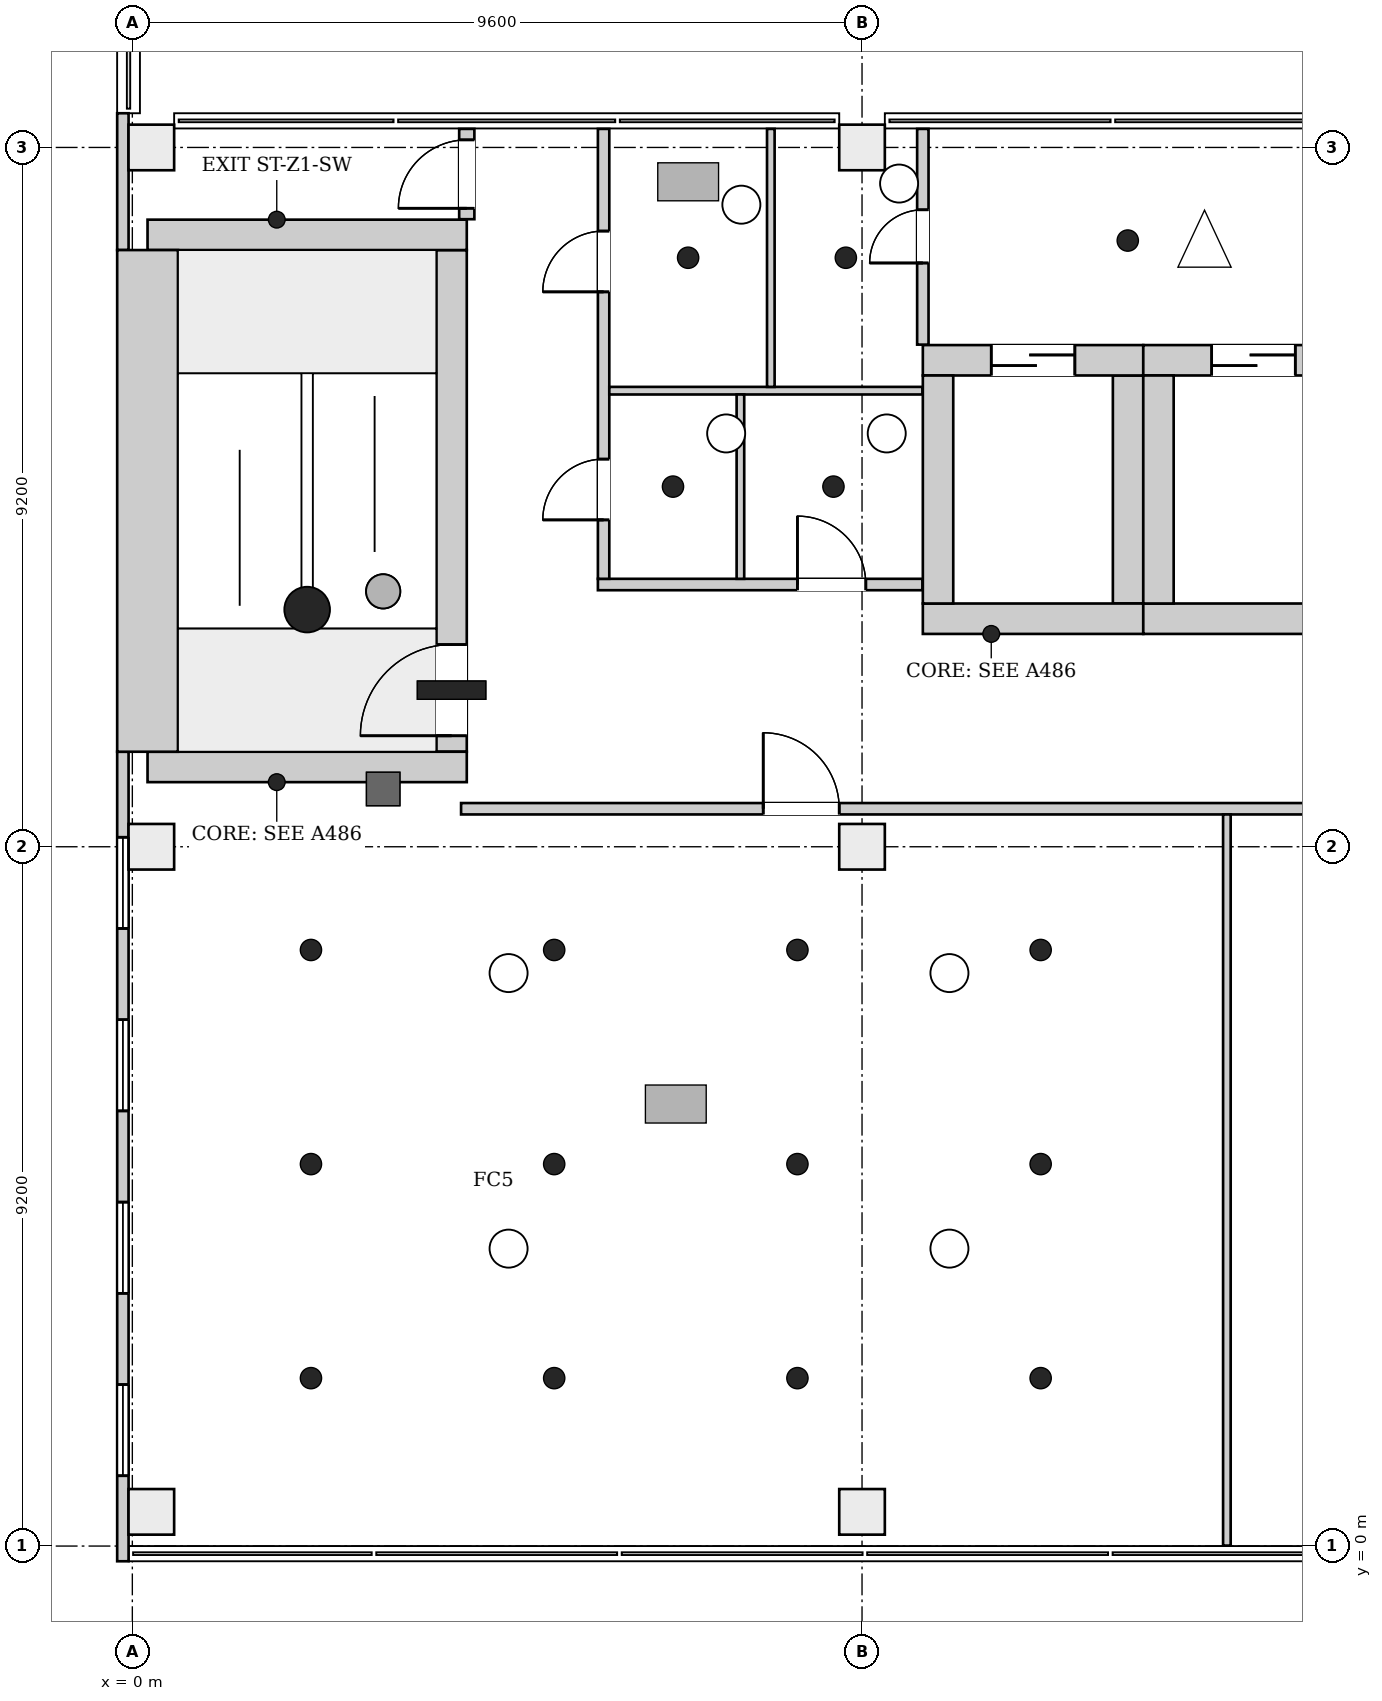
"""IFC4 building model, lengths in metres.
Left out: names, types, materials, properties, quantities, classifications, styles, units other than length and angle.
Written with IfcOpenShell. Run it as: python <this file> out.ifc"""

import sys

from ifc_helpers import new_model, si_unit, direction, frame, frame_2d, origin, origin_2d, place, context, subcontext, project, spatial, rectangle, extrude, element, fill, save


model = new_model("IFC4")
c1 = context("Model", 3, precision=1e-05, world=origin(), true_north=direction((0.0, 1.0)))
c2 = subcontext(c1, "Body", "Model", "MODEL_VIEW")
j1 = project(units=[si_unit("LENGTHUNIT", "METRE"), si_unit("PLANEANGLEUNIT", "RADIAN")], contexts=[c1])
p1 = place(None, origin())
s1 = spatial("IfcSite", under=j1, at=p1, CompositionType="ELEMENT")
p2 = place(p1, origin())
s2 = spatial("IfcBuilding", under=s1, at=p2, CompositionType="ELEMENT")
p3 = place(p2, frame((0.0, 0.0, 73.9)))
s3 = spatial("IfcBuildingStorey", under=s2, at=p3, CompositionType="ELEMENT", Elevation=73.9)
for number, where, z_axis, x_axis in (
    (1, (0.2, 10.25, 0.0), (0.0, 0.0, 1.0), (1.0, 0.0, 0.0)),
    (2, (0.2, 17.25, 0.0), (0.0, 0.0, 1.0), (1.0, 0.0, 0.0)),
):
    element("IfcWall", number, at=place(p3, frame(where, z_axis=z_axis, x_axis=x_axis)), inside=s3, PredefinedType="SHEAR", context=c2, shape_type="SweptSolid", body=[
        extrude(rectangle(XDim=4.2, YDim=0.4, at=frame_2d((2.1, 0.0))), origin(), (0.0, 0.0, 1.0), 4.2),
    ])
p4 = place(p3, frame((0.2, 10.45, 0.0), z_axis=(0.0, 0.0, 1.0), x_axis=(0.0, 1.0, 0.0)))
e3 = element("IfcWall", 3, at=p4, inside=s3, PredefinedType="SHEAR", context=c2, shape_type="SweptSolid", body=[
    extrude(rectangle(XDim=6.6, YDim=0.8, at=frame_2d((3.3, 0.0))), origin(), (0.0, 0.0, 1.0), 4.2),
])
p5 = place(p3, frame((4.2, 10.45, 0.0), z_axis=(0.0, 0.0, 1.0), x_axis=(0.0, 1.0, 0.0)))
e4 = element("IfcWall", 4, at=p5, inside=s3, PredefinedType="SHEAR", context=c2, shape_type="SweptSolid", body=[
    extrude(rectangle(XDim=6.6, YDim=0.4, at=frame_2d((3.3, 0.0))), origin(), (0.0, 0.0, 1.0), 4.2),
])
p6 = place(p5, frame((0.21, 0.0, 0.0)))
e5 = element("IfcOpeningElement", 5, at=p6, cuts=e4, PredefinedType="OPENING", context=c2, shape_type="SweptSolid", body=[
    extrude(rectangle(XDim=1.2, YDim=2.1, at=frame_2d((0.6, 1.05))), frame((0.0, 0.21, 0.0), z_axis=(0.0, -1.0, 0.0), x_axis=(1.0, 0.0, 0.0)), (0.0, 0.0, 1.0), 0.42),
])
p7 = place(p3, frame((10.4, 12.2, 0.0), z_axis=(0.0, 0.0, 1.0), x_axis=(1.0, 0.0, 0.0)))
e6 = element("IfcWall", 6, at=p7, inside=s3, PredefinedType="SHEAR", context=c2, shape_type="SweptSolid", body=[
    extrude(rectangle(XDim=2.9, YDim=0.4, at=frame_2d((1.45, 0.0))), origin(), (0.0, 0.0, 1.0), 4.2),
])
p8 = place(p3, frame((10.4, 15.6, 0.0), z_axis=(0.0, 0.0, 1.0), x_axis=(1.0, 0.0, 0.0)))
e7 = element("IfcWall", 7, at=p8, inside=s3, PredefinedType="SHEAR", context=c2, shape_type="SweptSolid", body=[
    extrude(rectangle(XDim=2.9, YDim=0.4, at=frame_2d((1.45, 0.0))), origin(), (0.0, 0.0, 1.0), 4.2),
])
p9 = place(p8, frame((0.9, 0.0, 0.0)))
e8 = element("IfcOpeningElement", 8, at=p9, cuts=e7, PredefinedType="OPENING", context=c2, shape_type="SweptSolid", body=[
    extrude(rectangle(XDim=1.1, YDim=2.1, at=frame_2d((0.55, 1.05))), frame((0.0, 0.21, 0.0), z_axis=(0.0, -1.0, 0.0), x_axis=(1.0, 0.0, 0.0)), (0.0, 0.0, 1.0), 0.42),
])
for number, where, z_axis, x_axis in (
    (9, (10.6, 12.4, 0.0), (0.0, 0.0, 1.0), (0.0, 1.0, 0.0)),
    (10, (13.1, 12.4, 0.0), (0.0, 0.0, 1.0), (0.0, 1.0, 0.0)),
):
    element("IfcWall", number, at=place(p3, frame(where, z_axis=z_axis, x_axis=x_axis)), inside=s3, PredefinedType="SHEAR", context=c2, shape_type="SweptSolid", body=[
        extrude(rectangle(XDim=3.0, YDim=0.4, at=frame_2d((1.5, 0.0))), origin(), (0.0, 0.0, 1.0), 4.2),
    ])
p10 = place(p3, frame((13.3, 12.2, 0.0), z_axis=(0.0, 0.0, 1.0), x_axis=(1.0, 0.0, 0.0)))
e11 = element("IfcWall", 11, at=p10, inside=s3, PredefinedType="SHEAR", context=c2, shape_type="SweptSolid", body=[
    extrude(rectangle(XDim=2.9, YDim=0.4, at=frame_2d((1.45, 0.0))), origin(), (0.0, 0.0, 1.0), 4.2),
])
p11 = place(p3, frame((13.3, 15.6, 0.0), z_axis=(0.0, 0.0, 1.0), x_axis=(1.0, 0.0, 0.0)))
e12 = element("IfcWall", 12, at=p11, inside=s3, PredefinedType="SHEAR", context=c2, shape_type="SweptSolid", body=[
    extrude(rectangle(XDim=2.9, YDim=0.4, at=frame_2d((1.45, 0.0))), origin(), (0.0, 0.0, 1.0), 4.2),
])
p12 = place(p11, frame((0.9, 0.0, 0.0)))
e13 = element("IfcOpeningElement", 13, at=p12, cuts=e12, PredefinedType="OPENING", context=c2, shape_type="SweptSolid", body=[
    extrude(rectangle(XDim=1.1, YDim=2.1, at=frame_2d((0.55, 1.05))), frame((0.0, 0.21, 0.0), z_axis=(0.0, -1.0, 0.0), x_axis=(1.0, 0.0, 0.0)), (0.0, 0.0, 1.0), 0.42),
])
p13 = place(p3, frame((13.5, 12.4, 0.0), z_axis=(0.0, 0.0, 1.0), x_axis=(0.0, 1.0, 0.0)))
e14 = element("IfcWall", 14, at=p13, inside=s3, PredefinedType="SHEAR", context=c2, shape_type="SweptSolid", body=[
    extrude(rectangle(XDim=3.0, YDim=0.4, at=frame_2d((1.5, 0.0))), origin(), (0.0, 0.0, 1.0), 4.2),
])
for number, where, z_axis, x_axis in (
    (15, (0.25, 0.45, 0.0), (0.0, 0.0, 1.0), (1.0, 0.0, 0.0)),
    (16, (9.6, 0.45, 0.0), (0.0, 0.0, 1.0), (1.0, 0.0, 0.0)),
    (17, (0.25, 9.2, 0.0), (0.0, 0.0, 1.0), (1.0, 0.0, 0.0)),
    (18, (9.6, 9.2, 0.0), (0.0, 0.0, 1.0), (1.0, 0.0, 0.0)),
    (19, (0.25, 18.4, 0.0), (0.0, 0.0, 1.0), (1.0, 0.0, 0.0)),
    (20, (9.6, 18.4, 0.0), (0.0, 0.0, 1.0), (1.0, 0.0, 0.0)),
):
    element("IfcColumn", number, at=place(p3, frame(where, z_axis=z_axis, x_axis=x_axis)), inside=s3, PredefinedType="COLUMN", context=c2, shape_type="SweptSolid", body=[
        extrude(rectangle(XDim=0.6, YDim=0.6, at=origin_2d()), origin(), (0.0, 0.0, 1.0), 4.2),
    ])
p14 = place(p3, frame((-0.125, 10.45, 0.0), z_axis=(0.0, 0.0, 1.0), x_axis=(0.0, -1.0, 0.0)))
e21 = element("IfcWall", 21, at=p14, inside=s3, PredefinedType="ELEMENTEDWALL", context=c2, shape_type="SweptSolid", body=[
    extrude(rectangle(XDim=10.65, YDim=0.15, at=frame_2d((5.325, 0.0))), origin(), (0.0, 0.0, 1.0), 3.9),
])
p15 = place(p14, frame((8.325, 0.0, 0.9)))
e22 = element("IfcOpeningElement", 22, at=p15, cuts=e21, PredefinedType="OPENING", context=c2, shape_type="SweptSolid", body=[
    extrude(rectangle(XDim=1.2, YDim=2.6, at=frame_2d((0.6, 1.3))), frame((0.0, 0.085, 0.0), z_axis=(0.0, -1.0, 0.0), x_axis=(1.0, 0.0, 0.0)), (0.0, 0.0, 1.0), 0.17),
])
p16 = place(p14, frame((5.925, 0.0, 0.9)))
e23 = element("IfcOpeningElement", 23, at=p16, cuts=e21, PredefinedType="OPENING", context=c2, shape_type="SweptSolid", body=[
    extrude(rectangle(XDim=1.2, YDim=2.6, at=frame_2d((0.6, 1.3))), frame((0.0, 0.085, 0.0), z_axis=(0.0, -1.0, 0.0), x_axis=(1.0, 0.0, 0.0)), (0.0, 0.0, 1.0), 0.17),
])
p17 = place(p14, frame((3.525, 0.0, 0.9)))
e24 = element("IfcOpeningElement", 24, at=p17, cuts=e21, PredefinedType="OPENING", context=c2, shape_type="SweptSolid", body=[
    extrude(rectangle(XDim=1.2, YDim=2.6, at=frame_2d((0.6, 1.3))), frame((0.0, 0.085, 0.0), z_axis=(0.0, -1.0, 0.0), x_axis=(1.0, 0.0, 0.0)), (0.0, 0.0, 1.0), 0.17),
])
p18 = place(p14, frame((1.125, 0.0, 0.9)))
e25 = element("IfcOpeningElement", 25, at=p18, cuts=e21, PredefinedType="OPENING", context=c2, shape_type="SweptSolid", body=[
    extrude(rectangle(XDim=1.2, YDim=2.6, at=frame_2d((0.6, 1.3))), frame((0.0, 0.085, 0.0), z_axis=(0.0, -1.0, 0.0), x_axis=(1.0, 0.0, 0.0)), (0.0, 0.0, 1.0), 0.17),
])
p19 = place(p3, frame((-0.125, 18.85, 0.0), z_axis=(0.0, 0.0, 1.0), x_axis=(0.0, -1.0, 0.0)))
e26 = element("IfcWall", 26, at=p19, inside=s3, PredefinedType="ELEMENTEDWALL", context=c2, shape_type="SweptSolid", body=[
    extrude(rectangle(XDim=1.8, YDim=0.15, at=frame_2d((0.9, 0.0))), origin(), (0.0, 0.0, 1.0), 3.9),
])
p20 = place(p3, frame((4.4, 17.456, 0.0), z_axis=(0.0, 0.0, 1.0), x_axis=(0.0, 1.0, 0.0)))
e27 = element("IfcWall", 27, at=p20, inside=s3, PredefinedType="PARTITIONING", context=c2, shape_type="SweptSolid", body=[
    extrude(rectangle(XDim=1.188, YDim=0.2, at=frame_2d((0.594, 0.0))), origin(), (0.0, 0.0, 1.0), 3.9),
])
p21 = place(p20, frame((0.144, 0.0, 0.0)))
e28 = element("IfcOpeningElement", 28, at=p21, cuts=e27, PredefinedType="OPENING", context=c2, shape_type="SweptSolid", body=[
    extrude(rectangle(XDim=0.9, YDim=2.1, at=frame_2d((0.45, 1.05))), frame((0.0, 0.11, 0.0), z_axis=(0.0, -1.0, 0.0), x_axis=(1.0, 0.0, 0.0)), (0.0, 0.0, 1.0), 0.22),
])
p22 = place(p3, frame((4.325, 9.7, 0.0), z_axis=(0.0, 0.0, 1.0), x_axis=(1.0, 0.0, 0.0)))
e29 = element("IfcWall", 29, at=p22, inside=s3, PredefinedType="PARTITIONING", context=c2, shape_type="SweptSolid", body=[
    extrude(rectangle(XDim=34.369, YDim=0.15, at=frame_2d((17.185, 0.0))), origin(), (0.0, 0.0, 1.0), 3.9),
])
p23 = place(p22, frame((3.975, 0.0, 0.0)))
e30 = element("IfcOpeningElement", 30, at=p23, cuts=e29, PredefinedType="OPENING", context=c2, shape_type="SweptSolid", body=[
    extrude(rectangle(XDim=1.0, YDim=2.1, at=frame_2d((0.5, 1.05))), frame((0.0, 0.085, 0.0), z_axis=(0.0, -1.0, 0.0), x_axis=(1.0, 0.0, 0.0)), (0.0, 0.0, 1.0), 0.17),
])
p24 = place(p22, frame((11.975, 0.0, 0.0)))
e31 = element("IfcOpeningElement", 31, at=p24, cuts=e29, PredefinedType="OPENING", context=c2, shape_type="SweptSolid", body=[
    extrude(rectangle(XDim=1.0, YDim=2.1, at=frame_2d((0.5, 1.05))), frame((0.0, 0.085, 0.0), z_axis=(0.0, -1.0, 0.0), x_axis=(1.0, 0.0, 0.0)), (0.0, 0.0, 1.0), 0.17),
])
p25 = place(p22, frame((19.175, 0.0, 0.0)))
e32 = element("IfcOpeningElement", 32, at=p25, cuts=e29, PredefinedType="OPENING", context=c2, shape_type="SweptSolid", body=[
    extrude(rectangle(XDim=1.0, YDim=2.1, at=frame_2d((0.5, 1.05))), frame((0.0, 0.085, 0.0), z_axis=(0.0, -1.0, 0.0), x_axis=(1.0, 0.0, 0.0)), (0.0, 0.0, 1.0), 0.17),
])
p26 = place(p22, frame((28.925, 0.0, 0.0)))
e33 = element("IfcOpeningElement", 33, at=p26, cuts=e29, PredefinedType="OPENING", context=c2, shape_type="SweptSolid", body=[
    extrude(rectangle(XDim=1.0, YDim=2.1, at=frame_2d((0.5, 1.05))), frame((0.0, 0.085, 0.0), z_axis=(0.0, -1.0, 0.0), x_axis=(1.0, 0.0, 0.0)), (0.0, 0.0, 1.0), 0.17),
])
p27 = place(p3, frame((6.125, 12.65, 0.0), z_axis=(0.0, 0.0, 1.0), x_axis=(1.0, 0.0, 0.0)))
e34 = element("IfcWall", 34, at=p27, inside=s3, PredefinedType="PARTITIONING", context=c2, shape_type="SweptSolid", body=[
    extrude(rectangle(XDim=4.269, YDim=0.15, at=frame_2d((2.135, 0.0))), origin(), (0.0, 0.0, 1.0), 3.9),
])
p28 = place(p27, frame((2.625, 0.0, 0.0)))
e35 = element("IfcOpeningElement", 35, at=p28, cuts=e34, PredefinedType="OPENING", context=c2, shape_type="SweptSolid", body=[
    extrude(rectangle(XDim=0.9, YDim=2.1, at=frame_2d((0.45, 1.05))), frame((0.0, 0.085, 0.0), z_axis=(0.0, -1.0, 0.0), x_axis=(1.0, 0.0, 0.0)), (0.0, 0.0, 1.0), 0.17),
])
p29 = place(p3, frame((6.2, 12.725, 0.0), z_axis=(0.0, 0.0, 1.0), x_axis=(0.0, 1.0, 0.0)))
e36 = element("IfcWall", 36, at=p29, inside=s3, PredefinedType="PARTITIONING", context=c2, shape_type="SweptSolid", body=[
    extrude(rectangle(XDim=5.919, YDim=0.15, at=frame_2d((2.959, 0.0))), origin(), (0.0, 0.0, 1.0), 3.9),
])
p30 = place(p29, frame((0.775, 0.0, 0.0)))
e37 = element("IfcOpeningElement", 37, at=p30, cuts=e36, PredefinedType="OPENING", context=c2, shape_type="SweptSolid", body=[
    extrude(rectangle(XDim=0.8, YDim=2.1, at=frame_2d((0.4, 1.05))), frame((0.0, 0.085, 0.0), z_axis=(0.0, -1.0, 0.0), x_axis=(1.0, 0.0, 0.0)), (0.0, 0.0, 1.0), 0.17),
])
p31 = place(p29, frame((3.775, 0.0, 0.0)))
e38 = element("IfcOpeningElement", 38, at=p31, cuts=e36, PredefinedType="OPENING", context=c2, shape_type="SweptSolid", body=[
    extrude(rectangle(XDim=0.8, YDim=2.1, at=frame_2d((0.4, 1.05))), frame((0.0, 0.085, 0.0), z_axis=(0.0, -1.0, 0.0), x_axis=(1.0, 0.0, 0.0)), (0.0, 0.0, 1.0), 0.17),
])
p32 = place(p3, frame((6.275, 15.2, 0.0), z_axis=(0.0, 0.0, 1.0), x_axis=(1.0, 0.0, 0.0)))
e39 = element("IfcWall", 39, at=p32, inside=s3, PredefinedType="PARTITIONING", context=c2, shape_type="SweptSolid", body=[
    extrude(rectangle(XDim=4.119, YDim=0.1, at=frame_2d((2.06, 0.0))), origin(), (0.0, 0.0, 1.0), 3.9),
])
p33 = place(p3, frame((8.0, 12.725, 0.0), z_axis=(0.0, 0.0, 1.0), x_axis=(0.0, 1.0, 0.0)))
e40 = element("IfcWall", 40, at=p33, inside=s3, PredefinedType="PARTITIONING", context=c2, shape_type="SweptSolid", body=[
    extrude(rectangle(XDim=2.425, YDim=0.1, at=frame_2d((1.212, 0.0))), origin(), (0.0, 0.0, 1.0), 3.9),
])
p34 = place(p3, frame((8.4, 15.25, 0.0), z_axis=(0.0, 0.0, 1.0), x_axis=(0.0, 1.0, 0.0)))
e41 = element("IfcWall", 41, at=p34, inside=s3, PredefinedType="PARTITIONING", context=c2, shape_type="SweptSolid", body=[
    extrude(rectangle(XDim=3.394, YDim=0.1, at=frame_2d((1.697, 0.0))), origin(), (0.0, 0.0, 1.0), 3.9),
])
p35 = place(p3, frame((10.4, 15.806, 0.0), z_axis=(0.0, 0.0, 1.0), x_axis=(0.0, 1.0, 0.0)))
e42 = element("IfcWall", 42, at=p35, inside=s3, PredefinedType="PARTITIONING", context=c2, shape_type="SweptSolid", body=[
    extrude(rectangle(XDim=2.838, YDim=0.15, at=frame_2d((1.419, 0.0))), origin(), (0.0, 0.0, 1.0), 3.9),
])
p36 = place(p35, frame((1.074, 0.0, 0.0)))
e43 = element("IfcOpeningElement", 43, at=p36, cuts=e42, PredefinedType="OPENING", context=c2, shape_type="SweptSolid", body=[
    extrude(rectangle(XDim=0.7, YDim=2.1, at=frame_2d((0.35, 1.05))), frame((0.0, 0.085, 0.0), z_axis=(0.0, -1.0, 0.0), x_axis=(1.0, 0.0, 0.0)), (0.0, 0.0, 1.0), 0.17),
])
p37 = place(p3, frame((14.4, 0.006, 0.0), z_axis=(0.0, 0.0, 1.0), x_axis=(0.0, 1.0, 0.0)))
e44 = element("IfcWall", 44, at=p37, inside=s3, PredefinedType="PARTITIONING", context=c2, shape_type="SweptSolid", body=[
    extrude(rectangle(XDim=9.619, YDim=0.1, at=frame_2d((4.81, 0.0))), origin(), (0.0, 0.0, 1.0), 3.9),
])
p38 = place(p15, origin())
e45 = element("IfcWindow", 45, at=p38, inside=s3, PartitioningType="SINGLE_PANEL", PredefinedType="WINDOW", context=c2, shape_type="SweptSolid", body=[
    extrude(rectangle(XDim=1.2, YDim=2.6, at=frame_2d((0.6, 1.3))), frame((0.0, 0.03, 0.0), z_axis=(0.0, -1.0, 0.0), x_axis=(1.0, 0.0, 0.0)), (0.0, 0.0, 1.0), 0.06),
])
fill(e22, e45)
p39 = place(p16, origin())
e46 = element("IfcWindow", 46, at=p39, inside=s3, PartitioningType="SINGLE_PANEL", PredefinedType="WINDOW", context=c2, shape_type="SweptSolid", body=[
    extrude(rectangle(XDim=1.2, YDim=2.6, at=frame_2d((0.6, 1.3))), frame((0.0, 0.03, 0.0), z_axis=(0.0, -1.0, 0.0), x_axis=(1.0, 0.0, 0.0)), (0.0, 0.0, 1.0), 0.06),
])
fill(e23, e46)
p40 = place(p17, origin())
e47 = element("IfcWindow", 47, at=p40, inside=s3, PartitioningType="SINGLE_PANEL", PredefinedType="WINDOW", context=c2, shape_type="SweptSolid", body=[
    extrude(rectangle(XDim=1.2, YDim=2.6, at=frame_2d((0.6, 1.3))), frame((0.0, 0.03, 0.0), z_axis=(0.0, -1.0, 0.0), x_axis=(1.0, 0.0, 0.0)), (0.0, 0.0, 1.0), 0.06),
])
fill(e24, e47)
p41 = place(p18, origin())
e48 = element("IfcWindow", 48, at=p41, inside=s3, PartitioningType="SINGLE_PANEL", PredefinedType="WINDOW", context=c2, shape_type="SweptSolid", body=[
    extrude(rectangle(XDim=1.2, YDim=2.6, at=frame_2d((0.6, 1.3))), frame((0.0, 0.03, 0.0), z_axis=(0.0, -1.0, 0.0), x_axis=(1.0, 0.0, 0.0)), (0.0, 0.0, 1.0), 0.06),
])
fill(e25, e48)
p42 = place(p6, origin())
e49 = element("IfcDoor", 49, at=p42, inside=s3, OperationType="SINGLE_SWING_RIGHT", PredefinedType="DOOR", context=c2, shape_type="SweptSolid", body=[
    extrude(rectangle(XDim=1.2, YDim=2.1, at=frame_2d((0.6, 1.05))), frame((0.0, 0.025, 0.0), z_axis=(0.0, -1.0, 0.0), x_axis=(1.0, 0.0, 0.0)), (0.0, 0.0, 1.0), 0.05),
])
fill(e5, e49)
p43 = place(p9, origin())
e50 = element("IfcDoor", 50, at=p43, inside=s3, OperationType="DOUBLE_DOOR_SLIDING", PredefinedType="DOOR", context=c2, shape_type="SweptSolid", body=[
    extrude(rectangle(XDim=1.1, YDim=2.1, at=frame_2d((0.55, 1.05))), frame((0.0, 0.025, 0.0), z_axis=(0.0, -1.0, 0.0), x_axis=(1.0, 0.0, 0.0)), (0.0, 0.0, 1.0), 0.05),
])
fill(e8, e50)
p44 = place(p12, origin())
e51 = element("IfcDoor", 51, at=p44, inside=s3, OperationType="DOUBLE_DOOR_SLIDING", PredefinedType="DOOR", context=c2, shape_type="SweptSolid", body=[
    extrude(rectangle(XDim=1.1, YDim=2.1, at=frame_2d((0.55, 1.05))), frame((0.0, 0.025, 0.0), z_axis=(0.0, -1.0, 0.0), x_axis=(1.0, 0.0, 0.0)), (0.0, 0.0, 1.0), 0.05),
])
fill(e13, e51)
p45 = place(p21, origin())
e52 = element("IfcDoor", 52, at=p45, inside=s3, OperationType="SINGLE_SWING_LEFT", PredefinedType="DOOR", context=c2, shape_type="SweptSolid", body=[
    extrude(rectangle(XDim=0.9, YDim=2.1, at=frame_2d((0.45, 1.05))), frame((0.0, 0.025, 0.0), z_axis=(0.0, -1.0, 0.0), x_axis=(1.0, 0.0, 0.0)), (0.0, 0.0, 1.0), 0.05),
])
fill(e28, e52)
p46 = place(p30, origin())
e53 = element("IfcDoor", 53, at=p46, inside=s3, OperationType="SINGLE_SWING_LEFT", PredefinedType="DOOR", context=c2, shape_type="SweptSolid", body=[
    extrude(rectangle(XDim=0.8, YDim=2.1, at=frame_2d((0.4, 1.05))), frame((0.0, 0.025, 0.0), z_axis=(0.0, -1.0, 0.0), x_axis=(1.0, 0.0, 0.0)), (0.0, 0.0, 1.0), 0.05),
])
fill(e37, e53)
p47 = place(p28, origin())
e54 = element("IfcDoor", 54, at=p47, inside=s3, OperationType="SINGLE_SWING_RIGHT", PredefinedType="DOOR", context=c2, shape_type="SweptSolid", body=[
    extrude(rectangle(XDim=0.9, YDim=2.1, at=frame_2d((0.45, 1.05))), frame((0.0, 0.025, 0.0), z_axis=(0.0, -1.0, 0.0), x_axis=(1.0, 0.0, 0.0)), (0.0, 0.0, 1.0), 0.05),
])
fill(e35, e54)
p48 = place(p31, origin())
e55 = element("IfcDoor", 55, at=p48, inside=s3, OperationType="SINGLE_SWING_LEFT", PredefinedType="DOOR", context=c2, shape_type="SweptSolid", body=[
    extrude(rectangle(XDim=0.8, YDim=2.1, at=frame_2d((0.4, 1.05))), frame((0.0, 0.025, 0.0), z_axis=(0.0, -1.0, 0.0), x_axis=(1.0, 0.0, 0.0)), (0.0, 0.0, 1.0), 0.05),
])
fill(e38, e55)
p49 = place(p36, origin())
e56 = element("IfcDoor", 56, at=p49, inside=s3, OperationType="SINGLE_SWING_LEFT", PredefinedType="DOOR", context=c2, shape_type="SweptSolid", body=[
    extrude(rectangle(XDim=0.7, YDim=2.1, at=frame_2d((0.35, 1.05))), frame((0.0, 0.025, 0.0), z_axis=(0.0, -1.0, 0.0), x_axis=(1.0, 0.0, 0.0)), (0.0, 0.0, 1.0), 0.05),
])
fill(e43, e56)
p50 = place(p23, origin())
e57 = element("IfcDoor", 57, at=p50, inside=s3, OperationType="SINGLE_SWING_RIGHT", PredefinedType="DOOR", context=c2, shape_type="SweptSolid", body=[
    extrude(rectangle(XDim=1.0, YDim=2.1, at=frame_2d((0.5, 1.05))), frame((0.0, 0.025, 0.0), z_axis=(0.0, -1.0, 0.0), x_axis=(1.0, 0.0, 0.0)), (0.0, 0.0, 1.0), 0.05),
])
fill(e30, e57)
save(model, sys.argv[1])
